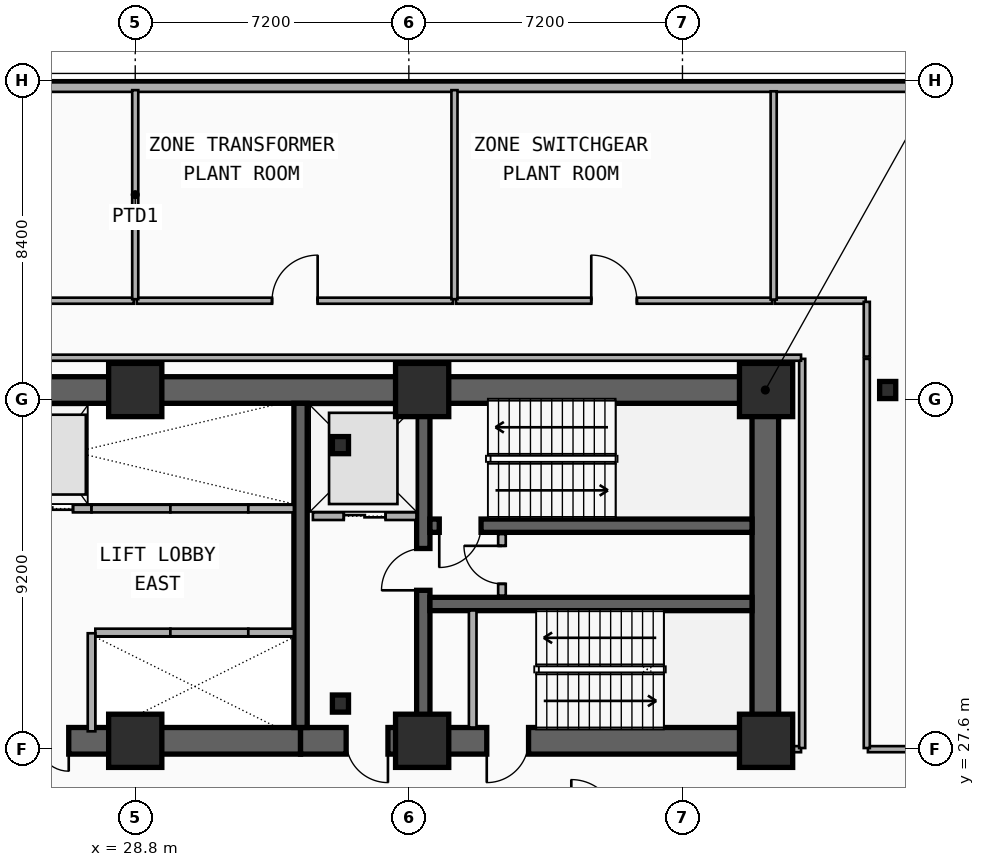
"""IFC4 building model, lengths in metres.
Left out: names, types, materials, properties, quantities, classifications, styles, units other than length and angle.
Written with IfcOpenShell. Run it as: python <this file> out.ifc"""

import sys

from ifc_helpers import new_model, si_unit, direction, frame, frame_2d, origin, origin_2d, place, context, subcontext, project, spatial, rectangle, i_section, extrude, element, fill, save


model = new_model("IFC4")
c1 = context("Model", 3, precision=1e-05, world=origin(), true_north=direction((0.0, 1.0)))
c2 = subcontext(c1, "Body", "Model", "MODEL_VIEW")
j1 = project(units=[si_unit("LENGTHUNIT", "METRE"), si_unit("PLANEANGLEUNIT", "RADIAN")], contexts=[c1])
p1 = place(None, origin())
s1 = spatial("IfcSite", under=j1, at=p1, CompositionType="ELEMENT")
p2 = place(p1, origin())
s2 = spatial("IfcBuilding", under=s1, at=p2, CompositionType="ELEMENT")
p3 = place(p2, frame((0.0, 0.0, 74.5)))
s3 = spatial("IfcBuildingStorey", under=s2, at=p3, CompositionType="ELEMENT", Elevation=74.5)
p4 = place(p3, frame((12.15, 37.05, 0.0), z_axis=(0.0, 0.0, 1.0), x_axis=(1.0, 0.0, 0.0)))
e1 = element("IfcWall", 1, at=p4, inside=s3, PredefinedType="SHEAR", context=c2, shape_type="SweptSolid", body=[
    extrude(rectangle(XDim=33.23, YDim=0.7, at=frame_2d((16.615, 0.0))), origin(), (0.0, 0.0, 1.0), 4.8),
])
p5 = place(p3, frame((33.15, 27.82, 0.0), z_axis=(0.0, 0.0, 1.0), x_axis=(-1.0, 0.0, 0.0)))
e2 = element("IfcWall", 2, at=p5, inside=s3, PredefinedType="SHEAR", context=c2, shape_type="SweptSolid", body=[
    extrude(rectangle(XDim=11.97, YDim=0.7, at=frame_2d((5.985, 0.0))), origin(), (0.0, 0.0, 1.0), 4.8),
])
p6 = place(p5, frame((6.1, 0.0, 0.0)))
e3 = element("IfcOpeningElement", 3, at=p6, cuts=e2, PredefinedType="OPENING", context=c2, shape_type="SweptSolid", body=[
    extrude(rectangle(XDim=1.6, YDim=2.2, at=frame_2d((0.8, 1.1))), frame((0.0, 0.36, 0.0), z_axis=(0.0, -1.0, 0.0), x_axis=(1.0, 0.0, 0.0)), (0.0, 0.0, 1.0), 0.72),
])
p7 = place(p3, frame((45.38, 27.82, 0.0), z_axis=(0.0, 0.0, 1.0), x_axis=(-1.0, 0.0, 0.0)))
e4 = element("IfcWall", 4, at=p7, inside=s3, PredefinedType="SHEAR", context=c2, shape_type="SweptSolid", body=[
    extrude(rectangle(XDim=12.23, YDim=0.7, at=frame_2d((6.115, 0.0))), origin(), (0.0, 0.0, 1.0), 4.8),
])
p8 = place(p7, frame((9.93, 0.0, 0.0)))
e5 = element("IfcOpeningElement", 5, at=p8, cuts=e4, PredefinedType="OPENING", context=c2, shape_type="SweptSolid", body=[
    extrude(rectangle(XDim=1.1, YDim=2.15, at=frame_2d((0.55, 1.075))), frame((0.0, 0.36, 0.0), z_axis=(0.0, -1.0, 0.0), x_axis=(1.0, 0.0, 0.0)), (0.0, 0.0, 1.0), 0.72),
])
p9 = place(p7, frame((6.23, 0.0, 0.0)))
e6 = element("IfcOpeningElement", 6, at=p9, cuts=e4, PredefinedType="OPENING", context=c2, shape_type="SweptSolid", body=[
    extrude(rectangle(XDim=1.1, YDim=2.15, at=frame_2d((0.55, 1.075))), frame((0.0, 0.36, 0.0), z_axis=(0.0, -1.0, 0.0), x_axis=(1.0, 0.0, 0.0)), (0.0, 0.0, 1.0), 0.72),
])
p10 = place(p3, frame((45.38, 28.17, 0.0), z_axis=(0.0, 0.0, 1.0), x_axis=(0.0, 1.0, 0.0)))
e7 = element("IfcWall", 7, at=p10, inside=s3, PredefinedType="SHEAR", context=c2, shape_type="SweptSolid", body=[
    extrude(rectangle(XDim=8.53, YDim=0.7, at=frame_2d((4.265, 0.0))), origin(), (0.0, 0.0, 1.0), 4.8),
])
p11 = place(p3, frame((33.15, 28.17, 0.0), z_axis=(0.0, 0.0, 1.0), x_axis=(0.0, 1.0, 0.0)))
e8 = element("IfcWall", 8, at=p11, inside=s3, PredefinedType="SHEAR", context=c2, shape_type="SweptSolid", body=[
    extrude(rectangle(XDim=8.53, YDim=0.35, at=frame_2d((4.265, 0.0))), origin(), (0.0, 0.0, 1.0), 4.8),
])
p12 = place(p3, frame((36.38, 28.17, 0.0), z_axis=(0.0, 0.0, 1.0), x_axis=(0.0, 1.0, 0.0)))
e9 = element("IfcWall", 9, at=p12, inside=s3, PredefinedType="SHEAR", context=c2, shape_type="SweptSolid", body=[
    extrude(rectangle(XDim=8.53, YDim=0.35, at=frame_2d((4.265, 0.0))), origin(), (0.0, 0.0, 1.0), 4.8),
])
p13 = place(p12, frame((3.61, 0.0, 0.0)))
e10 = element("IfcOpeningElement", 10, at=p13, cuts=e9, PredefinedType="OPENING", context=c2, shape_type="SweptSolid", body=[
    extrude(rectangle(XDim=1.1, YDim=2.15, at=frame_2d((0.55, 1.075))), frame((0.0, 0.185, 0.0), z_axis=(0.0, -1.0, 0.0), x_axis=(1.0, 0.0, 0.0)), (0.0, 0.0, 1.0), 0.37),
])
p14 = place(p3, frame((45.03, 33.48, 0.0), z_axis=(0.0, 0.0, 1.0), x_axis=(-1.0, 0.0, 0.0)))
e11 = element("IfcWall", 11, at=p14, inside=s3, PredefinedType="SHEAR", context=c2, shape_type="SweptSolid", body=[
    extrude(rectangle(XDim=8.475, YDim=0.35, at=frame_2d((4.238, 0.0))), origin(), (0.0, 0.0, 1.0), 4.8),
])
p15 = place(p14, frame((7.13, 0.0, 0.0)))
e12 = element("IfcOpeningElement", 12, at=p15, cuts=e11, PredefinedType="OPENING", context=c2, shape_type="SweptSolid", body=[
    extrude(rectangle(XDim=1.1, YDim=2.15, at=frame_2d((0.55, 1.075))), frame((0.0, 0.185, 0.0), z_axis=(0.0, -1.0, 0.0), x_axis=(1.0, 0.0, 0.0)), (0.0, 0.0, 1.0), 0.37),
])
p16 = place(p3, frame((36.555, 31.42, 0.0), z_axis=(0.0, 0.0, 1.0), x_axis=(1.0, 0.0, 0.0)))
e13 = element("IfcWall", 13, at=p16, inside=s3, PredefinedType="SHEAR", context=c2, shape_type="SweptSolid", body=[
    extrude(rectangle(XDim=8.475, YDim=0.35, at=frame_2d((4.238, 0.0))), origin(), (0.0, 0.0, 1.0), 4.8),
])
for number, where, z_axis, x_axis in (
    (14, (34.2, 28.8, 0.0), (0.0, 0.0, 1.0), (1.0, 0.0, 0.0)),
    (15, (34.2, 35.6, 0.0), (0.0, 0.0, 1.0), (1.0, 0.0, 0.0)),
):
    element("IfcColumn", number, at=place(p3, frame(where, z_axis=z_axis, x_axis=x_axis)), inside=s3, PredefinedType="COLUMN", context=c2, shape_type="SweptSolid", body=[
        extrude(i_section(OverallWidth=0.424, OverallDepth=0.45, WebThickness=0.041, FlangeThickness=0.065, FilletRadius=0.015, at=origin_2d()), origin(), (0.0, 0.0, 1.0), 4.8),
    ])
for number, where, z_axis, x_axis in (
    (16, (28.8, 27.82, 0.0), (0.0, 0.0, 1.0), (1.0, 0.0, 0.0)),
    (17, (28.8, 37.05, 0.0), (0.0, 0.0, 1.0), (1.0, 0.0, 0.0)),
    (18, (36.35, 27.82, 0.0), (0.0, 0.0, 1.0), (1.0, 0.0, 0.0)),
    (19, (36.35, 37.05, 0.0), (0.0, 0.0, 1.0), (1.0, 0.0, 0.0)),
    (20, (45.4, 27.82, 0.0), (0.0, 0.0, 1.0), (1.0, 0.0, 0.0)),
    (21, (45.4, 37.05, 0.0), (0.0, 0.0, 1.0), (1.0, 0.0, 0.0)),
):
    element("IfcColumn", number, at=place(p3, frame(where, z_axis=z_axis, x_axis=x_axis)), inside=s3, PredefinedType="COLUMN", context=c2, shape_type="SweptSolid", body=[
        extrude(rectangle(XDim=1.4, YDim=1.4, at=origin_2d()), origin(), (0.0, 0.0, 1.0), 4.8),
    ])
p17 = place(p3, frame((48.6, 37.05, 0.0), z_axis=(0.0, 0.0, 1.0), x_axis=(1.0, 0.0, 0.0)))
e22 = element("IfcColumn", 22, at=p17, inside=s3, PredefinedType="COLUMN", context=c2, shape_type="SweptSolid", body=[
    extrude(i_section(OverallWidth=0.424, OverallDepth=0.45, WebThickness=0.041, FlangeThickness=0.065, FilletRadius=0.015, at=origin_2d()), origin(), (0.0, 0.0, 1.0), 4.8),
])
p18 = place(p3, frame((4.2, 45.02, 0.0), z_axis=(0.0, 0.0, 1.0), x_axis=(1.0, 0.0, 0.0)))
e23 = element("IfcWall", 23, at=p18, inside=s3, PredefinedType="SOLIDWALL", context=c2, shape_type="SweptSolid", body=[
    extrude(rectangle(XDim=49.2, YDim=0.25, at=frame_2d((24.6, 0.0))), origin(), (0.0, 0.0, 1.0), 4.48),
])
p19 = place(p3, frame((33.475, 33.73, 0.0), z_axis=(0.0, 0.0, 1.0), x_axis=(1.0, 0.0, 0.0)))
e24 = element("IfcWall", 24, at=p19, inside=s3, PredefinedType="PARTITIONING", context=c2, shape_type="SweptSolid", body=[
    extrude(rectangle(XDim=2.725, YDim=0.2, at=frame_2d((1.362, 0.0))), origin(), (0.0, 0.0, 1.0), 3.452),
])
p20 = place(p19, frame((0.812, 0.0, 0.0)))
e25 = element("IfcOpeningElement", 25, at=p20, cuts=e24, PredefinedType="OPENING", context=c2, shape_type="SweptSolid", body=[
    extrude(rectangle(XDim=1.1, YDim=2.15, at=frame_2d((0.55, 1.075))), frame((0.0, 0.11, 0.0), z_axis=(0.0, -1.0, 0.0), x_axis=(1.0, 0.0, 0.0)), (0.0, 0.0, 1.0), 0.22),
])
p21 = place(p3, frame((27.75, 30.67, 0.0), z_axis=(0.0, 0.0, 1.0), x_axis=(1.0, 0.0, 0.0)))
e26 = element("IfcWall", 26, at=p21, inside=s3, PredefinedType="PARTITIONING", context=c2, shape_type="SweptSolid", body=[
    extrude(rectangle(XDim=1.975, YDim=0.2, at=frame_2d((0.988, 0.0))), origin(), (0.0, 0.0, 1.0), 3.452),
])
p22 = place(p3, frame((27.65, 28.07, 0.0), z_axis=(0.0, 0.0, 1.0), x_axis=(0.0, 1.0, 0.0)))
e27 = element("IfcWall", 27, at=p22, inside=s3, PredefinedType="PARTITIONING", context=c2, shape_type="SweptSolid", body=[
    extrude(rectangle(XDim=2.58, YDim=0.2, at=frame_2d((1.29, 0.0))), origin(), (0.0, 0.0, 1.0), 3.452),
])
p23 = place(p3, frame((29.725, 30.67, 0.0), z_axis=(0.0, 0.0, 1.0), x_axis=(1.0, 0.0, 0.0)))
e28 = element("IfcWall", 28, at=p23, inside=s3, PredefinedType="PARTITIONING", context=c2, shape_type="SweptSolid", body=[
    extrude(rectangle(XDim=2.05, YDim=0.2, at=frame_2d((1.025, 0.0))), origin(), (0.0, 0.0, 1.0), 3.86),
])
p24 = place(p3, frame((31.775, 30.67, 0.0), z_axis=(0.0, 0.0, 1.0), x_axis=(1.0, 0.0, 0.0)))
e29 = element("IfcWall", 29, at=p24, inside=s3, PredefinedType="PARTITIONING", context=c2, shape_type="SweptSolid", body=[
    extrude(rectangle(XDim=1.2, YDim=0.2, at=frame_2d((0.6, 0.0))), origin(), (0.0, 0.0, 1.0), 3.86),
])
p25 = place(p3, frame((25.575, 33.93, 0.0), z_axis=(0.0, 0.0, 1.0), x_axis=(1.0, 0.0, 0.0)))
e30 = element("IfcWall", 30, at=p25, inside=s3, PredefinedType="PARTITIONING", context=c2, shape_type="SweptSolid", body=[
    extrude(rectangle(XDim=2.075, YDim=0.2, at=frame_2d((1.038, 0.0))), origin(), (0.0, 0.0, 1.0), 4.48),
])
p26 = place(p25, frame((0.488, 0.0, 0.0)))
e31 = element("IfcOpeningElement", 31, at=p26, cuts=e30, PredefinedType="OPENING", context=c2, shape_type="SweptSolid", body=[
    extrude(rectangle(XDim=1.1, YDim=2.15, at=frame_2d((0.55, 1.075))), frame((0.0, 0.11, 0.0), z_axis=(0.0, -1.0, 0.0), x_axis=(1.0, 0.0, 0.0)), (0.0, 0.0, 1.0), 0.22),
])
p27 = place(p3, frame((27.65, 33.93, 0.0), z_axis=(0.0, 0.0, 1.0), x_axis=(1.0, 0.0, 0.0)))
e32 = element("IfcWall", 32, at=p27, inside=s3, PredefinedType="PARTITIONING", context=c2, shape_type="SweptSolid", body=[
    extrude(rectangle(XDim=2.075, YDim=0.2, at=frame_2d((1.038, 0.0))), origin(), (0.0, 0.0, 1.0), 3.452),
])
p28 = place(p3, frame((29.725, 33.93, 0.0), z_axis=(0.0, 0.0, 1.0), x_axis=(1.0, 0.0, 0.0)))
e33 = element("IfcWall", 33, at=p28, inside=s3, PredefinedType="PARTITIONING", context=c2, shape_type="SweptSolid", body=[
    extrude(rectangle(XDim=2.05, YDim=0.2, at=frame_2d((1.025, 0.0))), origin(), (0.0, 0.0, 1.0), 4.48),
])
p29 = place(p3, frame((31.775, 33.93, 0.0), z_axis=(0.0, 0.0, 1.0), x_axis=(1.0, 0.0, 0.0)))
e34 = element("IfcWall", 34, at=p29, inside=s3, PredefinedType="PARTITIONING", context=c2, shape_type="SweptSolid", body=[
    extrude(rectangle(XDim=1.2, YDim=0.2, at=frame_2d((0.6, 0.0))), origin(), (0.0, 0.0, 1.0), 4.48),
])
p30 = place(p3, frame((37.68, 28.17, 0.0), z_axis=(0.0, 0.0, 1.0), x_axis=(0.0, 1.0, 0.0)))
e35 = element("IfcWall", 35, at=p30, inside=s3, PredefinedType="PARTITIONING", context=c2, shape_type="SweptSolid", body=[
    extrude(rectangle(XDim=3.08, YDim=0.2, at=frame_2d((1.54, 0.0))), origin(), (0.0, 0.0, 1.0), 3.86),
])
p31 = place(p3, frame((38.45, 31.64, 0.0), z_axis=(0.0, 0.0, 1.0), x_axis=(0.0, 1.0, 0.0)))
e36 = element("IfcWall", 36, at=p31, inside=s3, PredefinedType="PARTITIONING", context=c2, shape_type="SweptSolid", body=[
    extrude(rectangle(XDim=1.62, YDim=0.2, at=frame_2d((0.81, 0.0))), origin(), (0.0, 0.0, 1.0), 4.48),
])
p32 = place(p31, frame((0.31, 0.0, 0.0)))
e37 = element("IfcOpeningElement", 37, at=p32, cuts=e36, PredefinedType="OPENING", context=c2, shape_type="SweptSolid", body=[
    extrude(rectangle(XDim=1.0, YDim=2.15, at=frame_2d((0.5, 1.075))), frame((0.0, 0.11, 0.0), z_axis=(0.0, -1.0, 0.0), x_axis=(1.0, 0.0, 0.0)), (0.0, 0.0, 1.0), 0.22),
])
p33 = place(p3, frame((12.04, 39.4, 0.0), z_axis=(0.0, 0.0, 1.0), x_axis=(1.0, 0.0, 0.0)))
e38 = element("IfcWall", 38, at=p33, inside=s3, PredefinedType="PARTITIONING", context=c2, shape_type="SweptSolid", body=[
    extrude(rectangle(XDim=16.72, YDim=0.16, at=frame_2d((8.36, 0.0))), origin(), (0.0, 0.0, 1.0), 4.48),
])
p34 = place(p33, frame((7.76, 0.0, 0.0)))
e39 = element("IfcOpeningElement", 39, at=p34, cuts=e38, PredefinedType="OPENING", context=c2, shape_type="SweptSolid", body=[
    extrude(rectangle(XDim=1.2, YDim=2.15, at=frame_2d((0.6, 1.075))), frame((0.0, 0.09, 0.0), z_axis=(0.0, -1.0, 0.0), x_axis=(1.0, 0.0, 0.0)), (0.0, 0.0, 1.0), 0.18),
])
p35 = place(p3, frame((28.84, 39.4, 0.0), z_axis=(0.0, 0.0, 1.0), x_axis=(1.0, 0.0, 0.0)))
e40 = element("IfcWall", 40, at=p35, inside=s3, PredefinedType="PARTITIONING", context=c2, shape_type="SweptSolid", body=[
    extrude(rectangle(XDim=8.32, YDim=0.16, at=frame_2d((4.16, 0.0))), origin(), (0.0, 0.0, 1.0), 4.48),
])
p36 = place(p35, frame((3.56, 0.0, 0.0)))
e41 = element("IfcOpeningElement", 41, at=p36, cuts=e40, PredefinedType="OPENING", context=c2, shape_type="SweptSolid", body=[
    extrude(rectangle(XDim=1.2, YDim=2.15, at=frame_2d((0.6, 1.075))), frame((0.0, 0.09, 0.0), z_axis=(0.0, -1.0, 0.0), x_axis=(1.0, 0.0, 0.0)), (0.0, 0.0, 1.0), 0.18),
])
p37 = place(p3, frame((37.24, 39.4, 0.0), z_axis=(0.0, 0.0, 1.0), x_axis=(1.0, 0.0, 0.0)))
e42 = element("IfcWall", 42, at=p37, inside=s3, PredefinedType="PARTITIONING", context=c2, shape_type="SweptSolid", body=[
    extrude(rectangle(XDim=8.32, YDim=0.16, at=frame_2d((4.16, 0.0))), origin(), (0.0, 0.0, 1.0), 4.48),
])
p38 = place(p37, frame((3.56, 0.0, 0.0)))
e43 = element("IfcOpeningElement", 43, at=p38, cuts=e42, PredefinedType="OPENING", context=c2, shape_type="SweptSolid", body=[
    extrude(rectangle(XDim=1.2, YDim=2.15, at=frame_2d((0.6, 1.075))), frame((0.0, 0.09, 0.0), z_axis=(0.0, -1.0, 0.0), x_axis=(1.0, 0.0, 0.0)), (0.0, 0.0, 1.0), 0.18),
])
for number, where, z_axis, x_axis in (
    (44, (28.8, 39.44, 0.0), (0.0, 0.0, 1.0), (0.0, 1.0, 0.0)),
    (45, (37.2, 39.44, 0.0), (0.0, 0.0, 1.0), (0.0, 1.0, 0.0)),
):
    element("IfcWall", number, at=place(p3, frame(where, z_axis=z_axis, x_axis=x_axis)), inside=s3, PredefinedType="PARTITIONING", context=c2, shape_type="SweptSolid", body=[
        extrude(rectangle(XDim=5.5, YDim=0.16, at=frame_2d((2.75, 0.0))), origin(), (0.0, 0.0, 1.0), 4.48),
    ])
p39 = place(p3, frame((45.41, 27.6, 0.0), z_axis=(0.0, 0.0, 1.0), x_axis=(1.0, 0.0, 0.0)))
e46 = element("IfcWall", 46, at=p39, inside=s3, PredefinedType="PARTITIONING", context=c2, shape_type="SweptSolid", body=[
    extrude(rectangle(XDim=0.91, YDim=0.16, at=frame_2d((0.455, 0.0))), origin(), (0.0, 0.0, 1.0), 3.452),
])
p40 = place(p3, frame((48.08, 27.6, 0.0), z_axis=(0.0, 0.0, 1.0), x_axis=(1.0, 0.0, 0.0)))
e47 = element("IfcWall", 47, at=p40, inside=s3, PredefinedType="PARTITIONING", context=c2, shape_type="SweptSolid", body=[
    extrude(rectangle(XDim=9.23, YDim=0.16, at=frame_2d((4.615, 0.0))), origin(), (0.0, 0.0, 1.0), 3.81),
])
for number, where, z_axis, x_axis in (
    (48, (46.35, 27.63, 0.0), (0.0, 0.0, 1.0), (0.0, 1.0, 0.0)),
    (49, (48.05, 27.63, 0.0), (0.0, 0.0, 1.0), (0.0, 1.0, 0.0)),
):
    element("IfcWall", number, at=place(p3, frame(where, z_axis=z_axis, x_axis=x_axis)), inside=s3, PredefinedType="PARTITIONING", context=c2, shape_type="SweptSolid", body=[
        extrude(rectangle(XDim=10.24, YDim=0.16, at=frame_2d((5.12, 0.0))), origin(), (0.0, 0.0, 1.0), 3.96),
    ])
p41 = place(p3, frame((9.58, 37.9, 0.0), z_axis=(0.0, 0.0, 1.0), x_axis=(1.0, 0.0, 0.0)))
e50 = element("IfcWall", 50, at=p41, inside=s3, PredefinedType="PARTITIONING", context=c2, shape_type="SweptSolid", body=[
    extrude(rectangle(XDim=36.74, YDim=0.16, at=frame_2d((18.37, 0.0))), origin(), (0.0, 0.0, 1.0), 4.48),
])
p42 = place(p3, frame((45.63, 39.4, 0.0), z_axis=(0.0, 0.0, 1.0), x_axis=(1.0, 0.0, 0.0)))
e51 = element("IfcWall", 51, at=p42, inside=s3, PredefinedType="PARTITIONING", context=c2, shape_type="SweptSolid", body=[
    extrude(rectangle(XDim=2.39, YDim=0.16, at=frame_2d((1.195, 0.0))), origin(), (0.0, 0.0, 1.0), 4.48),
])
p43 = place(p3, frame((48.05, 37.93, 0.0), z_axis=(0.0, 0.0, 1.0), x_axis=(0.0, 1.0, 0.0)))
e52 = element("IfcWall", 52, at=p43, inside=s3, PredefinedType="PARTITIONING", context=c2, shape_type="SweptSolid", body=[
    extrude(rectangle(XDim=1.44, YDim=0.16, at=frame_2d((0.72, 0.0))), origin(), (0.0, 0.0, 1.0), 4.48),
])
p44 = place(p3, frame((45.6, 39.43, 0.0), z_axis=(0.0, 0.0, 1.0), x_axis=(0.0, 1.0, 0.0)))
e53 = element("IfcWall", 53, at=p44, inside=s3, PredefinedType="PARTITIONING", context=c2, shape_type="SweptSolid", body=[
    extrude(rectangle(XDim=5.48, YDim=0.16, at=frame_2d((2.74, 0.0))), origin(), (0.0, 0.0, 1.0), 4.48),
])
p45 = place(p20, origin())
e54 = element("IfcDoor", 54, at=p45, inside=s3, OperationType="DOUBLE_DOOR_SLIDING", PredefinedType="DOOR", context=c2, shape_type="SweptSolid", body=[
    extrude(rectangle(XDim=1.1, YDim=2.15, at=frame_2d((0.55, 1.075))), frame((0.0, 0.025, 0.0), z_axis=(0.0, -1.0, 0.0), x_axis=(1.0, 0.0, 0.0)), (0.0, 0.0, 1.0), 0.05),
])
fill(e25, e54)
p46 = place(p26, origin())
e55 = element("IfcDoor", 55, at=p46, inside=s3, OperationType="DOUBLE_DOOR_SLIDING", PredefinedType="DOOR", context=c2, shape_type="SweptSolid", body=[
    extrude(rectangle(XDim=1.1, YDim=2.15, at=frame_2d((0.55, 1.075))), frame((0.0, 0.025, 0.0), z_axis=(0.0, -1.0, 0.0), x_axis=(1.0, 0.0, 0.0)), (0.0, 0.0, 1.0), 0.05),
])
fill(e31, e55)
p47 = place(p15, origin())
e56 = element("IfcDoor", 56, at=p47, inside=s3, OperationType="SINGLE_SWING_RIGHT", PredefinedType="DOOR", context=c2, shape_type="SweptSolid", body=[
    extrude(rectangle(XDim=1.1, YDim=2.15, at=frame_2d((0.55, 1.075))), frame((0.0, 0.025, 0.0), z_axis=(0.0, -1.0, 0.0), x_axis=(1.0, 0.0, 0.0)), (0.0, 0.0, 1.0), 0.05),
])
fill(e12, e56)
p48 = place(p13, origin())
e57 = element("IfcDoor", 57, at=p48, inside=s3, OperationType="SINGLE_SWING_LEFT", PredefinedType="DOOR", context=c2, shape_type="SweptSolid", body=[
    extrude(rectangle(XDim=1.1, YDim=2.15, at=frame_2d((0.55, 1.075))), frame((0.0, 0.025, 0.0), z_axis=(0.0, -1.0, 0.0), x_axis=(1.0, 0.0, 0.0)), (0.0, 0.0, 1.0), 0.05),
])
fill(e10, e57)
p49 = place(p8, origin())
e58 = element("IfcDoor", 58, at=p49, inside=s3, OperationType="SINGLE_SWING_LEFT", PredefinedType="DOOR", context=c2, shape_type="SweptSolid", body=[
    extrude(rectangle(XDim=1.1, YDim=2.15, at=frame_2d((0.55, 1.075))), frame((0.0, 0.025, 0.0), z_axis=(0.0, -1.0, 0.0), x_axis=(1.0, 0.0, 0.0)), (0.0, 0.0, 1.0), 0.05),
])
fill(e5, e58)
p50 = place(p9, origin())
e59 = element("IfcDoor", 59, at=p50, inside=s3, OperationType="SINGLE_SWING_RIGHT", PredefinedType="DOOR", context=c2, shape_type="SweptSolid", body=[
    extrude(rectangle(XDim=1.1, YDim=2.15, at=frame_2d((0.55, 1.075))), frame((0.0, 0.025, 0.0), z_axis=(0.0, -1.0, 0.0), x_axis=(1.0, 0.0, 0.0)), (0.0, 0.0, 1.0), 0.05),
])
fill(e6, e59)
p51 = place(p6, origin())
e60 = element("IfcDoor", 60, at=p51, inside=s3, OperationType="SINGLE_SWING_LEFT", PredefinedType="DOOR", context=c2, shape_type="SweptSolid", body=[
    extrude(rectangle(XDim=1.6, YDim=2.2, at=frame_2d((0.8, 1.1))), frame((0.0, 0.025, 0.0), z_axis=(0.0, -1.0, 0.0), x_axis=(1.0, 0.0, 0.0)), (0.0, 0.0, 1.0), 0.05),
])
fill(e3, e60)
p52 = place(p32, origin())
e61 = element("IfcDoor", 61, at=p52, inside=s3, OperationType="SINGLE_SWING_RIGHT", PredefinedType="DOOR", context=c2, shape_type="SweptSolid", body=[
    extrude(rectangle(XDim=1.0, YDim=2.15, at=frame_2d((0.5, 1.075))), frame((0.0, 0.025, 0.0), z_axis=(0.0, -1.0, 0.0), x_axis=(1.0, 0.0, 0.0)), (0.0, 0.0, 1.0), 0.05),
])
fill(e37, e61)
p53 = place(p36, origin())
e62 = element("IfcDoor", 62, at=p53, inside=s3, OperationType="SINGLE_SWING_RIGHT", PredefinedType="DOOR", context=c2, shape_type="SweptSolid", body=[
    extrude(rectangle(XDim=1.2, YDim=2.15, at=frame_2d((0.6, 1.075))), frame((0.0, 0.025, 0.0), z_axis=(0.0, -1.0, 0.0), x_axis=(1.0, 0.0, 0.0)), (0.0, 0.0, 1.0), 0.05),
])
fill(e41, e62)
p54 = place(p38, origin())
e63 = element("IfcDoor", 63, at=p54, inside=s3, OperationType="SINGLE_SWING_LEFT", PredefinedType="DOOR", context=c2, shape_type="SweptSolid", body=[
    extrude(rectangle(XDim=1.2, YDim=2.15, at=frame_2d((0.6, 1.075))), frame((0.0, 0.025, 0.0), z_axis=(0.0, -1.0, 0.0), x_axis=(1.0, 0.0, 0.0)), (0.0, 0.0, 1.0), 0.05),
])
fill(e43, e63)
save(model, sys.argv[1])
